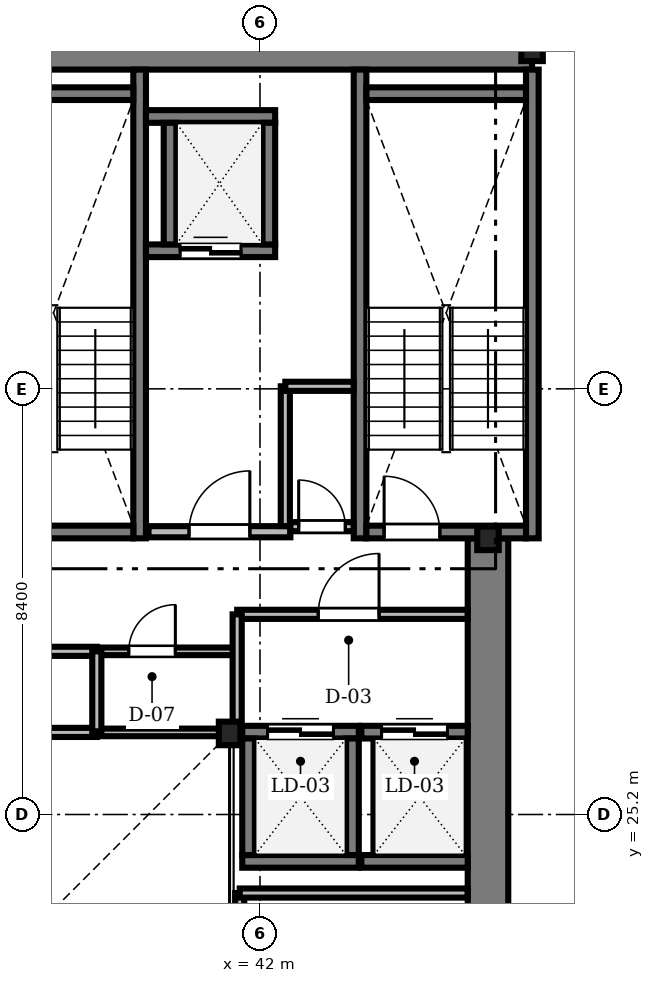
"""IFC4 building model, lengths in metres.
Left out: names, types, materials, properties, quantities, classifications, styles, units other than length and angle.
Written with IfcOpenShell. Run it as: python <this file> out.ifc"""

import sys

from ifc_helpers import new_model, si_unit, direction, frame, frame_2d, origin, origin_2d, place, context, subcontext, project, spatial, rectangle, i_section, extrude, source, transform, mapped, element, fill, save


model = new_model("IFC4")
c1 = context("Model", 3, precision=1e-05, world=origin(), true_north=direction((0.0, 1.0)))
c2 = subcontext(c1, "Body", "Model", "MODEL_VIEW")
j1 = project(units=[si_unit("LENGTHUNIT", "METRE"), si_unit("PLANEANGLEUNIT", "RADIAN")], contexts=[c1])
p1 = place(None, origin())
s1 = spatial("IfcSite", under=j1, at=p1, CompositionType="ELEMENT")
p2 = place(p1, origin())
s2 = spatial("IfcBuilding", under=s1, at=p2, CompositionType="ELEMENT")
p3 = place(p2, frame((0.0, 0.0, 129.8)))
s3 = spatial("IfcBuildingStorey", under=s2, at=p3, CompositionType="ELEMENT", Elevation=129.8)
m1 = source(origin(), c2, "Body", "SweptSolid", [
    extrude(rectangle(XDim=17.52, YDim=0.8, at=frame_2d((8.76, 0.0))), origin(), (0.0, 0.0, 1.0), 3.46),
])
p4 = place(p3, frame((29.85, 40.3, 0.0), z_axis=(0.0, 0.0, 1.0), x_axis=(1.0, 0.0, 0.0)))
e1 = element("IfcWall", 1, at=p4, inside=s3, PredefinedType="SHEAR", context=c2, shape_type="MappedRepresentation", body=[
    mapped(m1, transform((0.0, 0.0, 0.0), scale=1.0)),
])
m2 = source(origin(), c2, "Body", "SweptSolid", [
    extrude(rectangle(XDim=13.15, YDim=0.8, at=frame_2d((6.575, 0.0))), origin(), (0.0, 0.0, 1.0), 3.46),
])
p5 = place(p3, frame((46.5, 17.5, 0.0), z_axis=(0.0, 0.0, 1.0), x_axis=(0.0, 1.0, 0.0)))
e2 = element("IfcWall", 2, at=p5, inside=s3, PredefinedType="SHEAR", context=c2, shape_type="MappedRepresentation", body=[
    mapped(m2, transform((0.0, 0.0, 0.0), scale=1.0)),
])
m3 = source(origin(), c2, "Body", "SweptSolid", [
    extrude(i_section(OverallWidth=0.424, OverallDepth=0.465, WebThickness=0.035, FlangeThickness=0.056, FilletRadius=0.015, at=origin_2d()), origin(), (0.0, 0.0, 1.0), 3.46),
])
for number, where, z_axis, x_axis in (
    (3, (41.4, 26.8, 0.0), (0.0, 0.0, 1.0), (1.0, 0.0, 0.0)),
    (4, (46.5, 30.65, 0.0), (0.0, 0.0, 1.0), (1.0, 0.0, 0.0)),
    (5, (47.37, 40.3, 0.0), (0.0, 0.0, 1.0), (1.0, 0.0, 0.0)),
):
    element("IfcColumn", number, at=place(p3, frame(where, z_axis=z_axis, x_axis=x_axis)), inside=s3, PredefinedType="COLUMN", context=c2, shape_type="MappedRepresentation", body=[
        mapped(m3, transform((0.0, 0.0, 0.0), scale=1.0)),
    ])
m4 = source(origin(), c2, "Body", "SweptSolid", [
    extrude(rectangle(XDim=9.25, YDim=0.25, at=frame_2d((4.625, 0.0))), origin(), (0.0, 0.0, 1.0), 3.5),
])
p6 = place(p3, frame((39.625, 30.65, 0.0), z_axis=(0.0, 0.0, 1.0), x_axis=(0.0, 1.0, 0.0)))
e6 = element("IfcWall", 6, at=p6, inside=s3, PredefinedType="SOLIDWALL", context=c2, shape_type="MappedRepresentation", body=[
    mapped(m4, transform((0.0, 0.0, 0.0), scale=1.0)),
])
m5 = source(origin(), c2, "Body", "SweptSolid", [
    extrude(rectangle(XDim=3.15, YDim=0.25, at=frame_2d((1.575, 0.0))), origin(), (0.0, 0.0, 1.0), 3.5),
])
p7 = place(p3, frame((36.35, 39.425, 0.0), z_axis=(0.0, 0.0, 1.0), x_axis=(1.0, 0.0, 0.0)))
e7 = element("IfcWall", 7, at=p7, inside=s3, PredefinedType="SOLIDWALL", context=c2, shape_type="MappedRepresentation", body=[
    mapped(m5, transform((0.0, 0.0, 0.0), scale=1.0)),
])
p8 = place(p3, frame((36.35, 30.775, 0.0), z_axis=(0.0, 0.0, 1.0), x_axis=(1.0, 0.0, 0.0)))
e8 = element("IfcWall", 8, at=p8, inside=s3, PredefinedType="SOLIDWALL", context=c2, shape_type="MappedRepresentation", body=[
    mapped(m5, transform((0.0, 0.0, 0.0), scale=1.0)),
])
m6 = source(origin(), c2, "Body", "SweptSolid", [
    extrude(rectangle(XDim=1.1, YDim=2.2, at=frame_2d((0.55, 1.1))), frame((0.0, 0.135, 0.0), z_axis=(0.0, -1.0, 0.0), x_axis=(1.0, 0.0, 0.0)), (0.0, 0.0, 1.0), 0.27),
])
p9 = place(p8, frame((0.35, 0.0, 0.0)))
e9 = element("IfcOpeningElement", 9, at=p9, cuts=e8, PredefinedType="OPENING", context=c2, shape_type="MappedRepresentation", body=[
    mapped(m6, transform((0.0, 0.0, 0.0), scale=1.0)),
])
for number, where, z_axis, x_axis in (
    (10, (43.975, 30.65, 0.0), (0.0, 0.0, 1.0), (0.0, 1.0, 0.0)),
    (11, (47.375, 30.65, 0.0), (0.0, 0.0, 1.0), (0.0, 1.0, 0.0)),
):
    element("IfcWall", number, at=place(p3, frame(where, z_axis=z_axis, x_axis=x_axis)), inside=s3, PredefinedType="SOLIDWALL", context=c2, shape_type="MappedRepresentation", body=[
        mapped(m4, transform((0.0, 0.0, 0.0), scale=1.0)),
    ])
p10 = place(p3, frame((44.1, 39.425, 0.0), z_axis=(0.0, 0.0, 1.0), x_axis=(1.0, 0.0, 0.0)))
e12 = element("IfcWall", 12, at=p10, inside=s3, PredefinedType="SOLIDWALL", context=c2, shape_type="MappedRepresentation", body=[
    mapped(m5, transform((0.0, 0.0, 0.0), scale=1.0)),
])
p11 = place(p3, frame((44.1, 30.775, 0.0), z_axis=(0.0, 0.0, 1.0), x_axis=(1.0, 0.0, 0.0)))
e13 = element("IfcWall", 13, at=p11, inside=s3, PredefinedType="SOLIDWALL", context=c2, shape_type="MappedRepresentation", body=[
    mapped(m5, transform((0.0, 0.0, 0.0), scale=1.0)),
])
p12 = place(p11, frame((0.35, 0.0, 0.0)))
e14 = element("IfcOpeningElement", 14, at=p12, cuts=e13, PredefinedType="OPENING", context=c2, shape_type="MappedRepresentation", body=[
    mapped(m6, transform((0.0, 0.0, 0.0), scale=1.0)),
])
m7 = source(origin(), c2, "Body", "SweptSolid", [
    extrude(rectangle(XDim=2.8, YDim=0.22, at=frame_2d((1.4, 0.0))), origin(), (0.0, 0.0, 1.0), 3.46),
])
p13 = place(p3, frame((39.8, 30.78, 0.0), z_axis=(0.0, 0.0, 1.0), x_axis=(1.0, 0.0, 0.0)))
e15 = element("IfcWall", 15, at=p13, inside=s3, PredefinedType="SOLIDWALL", context=c2, shape_type="MappedRepresentation", body=[
    mapped(m7, transform((0.0, 0.0, 0.0), scale=1.0)),
])
m8 = source(origin(), c2, "Body", "SweptSolid", [
    extrude(rectangle(XDim=1.2, YDim=2.2, at=frame_2d((0.6, 1.1))), frame((0.0, 0.12, 0.0), z_axis=(0.0, -1.0, 0.0), x_axis=(1.0, 0.0, 0.0)), (0.0, 0.0, 1.0), 0.24),
])
p14 = place(p13, frame((0.8, 0.0, 0.0)))
e16 = element("IfcOpeningElement", 16, at=p14, cuts=e15, PredefinedType="OPENING", context=c2, shape_type="MappedRepresentation", body=[
    mapped(m8, transform((0.0, 0.0, 0.0), scale=1.0)),
])
m9 = source(origin(), c2, "Body", "SweptSolid", [
    extrude(rectangle(XDim=2.55, YDim=0.25, at=frame_2d((1.275, 0.0))), origin(), (0.0, 0.0, 1.0), 3.46),
])
p15 = place(p3, frame((39.75, 36.325, 0.0), z_axis=(0.0, 0.0, 1.0), x_axis=(1.0, 0.0, 0.0)))
e17 = element("IfcWall", 17, at=p15, inside=s3, PredefinedType="SOLIDWALL", context=c2, shape_type="MappedRepresentation", body=[
    mapped(m9, transform((0.0, 0.0, 0.0), scale=1.0)),
])
m10 = source(origin(), c2, "Body", "SweptSolid", [
    extrude(rectangle(XDim=1.2, YDim=2.25, at=frame_2d((0.6, 1.125))), frame((0.0, 0.135, 0.0), z_axis=(0.0, -1.0, 0.0), x_axis=(1.0, 0.0, 0.0)), (0.0, 0.0, 1.0), 0.27),
])
p16 = place(p15, frame((0.675, 0.0, 0.0)))
e18 = element("IfcOpeningElement", 18, at=p16, cuts=e17, PredefinedType="OPENING", context=c2, shape_type="MappedRepresentation", body=[
    mapped(m10, transform((0.0, 0.0, 0.0), scale=1.0)),
])
p17 = place(p3, frame((39.75, 38.975, 0.0), z_axis=(0.0, 0.0, 1.0), x_axis=(1.0, 0.0, 0.0)))
e19 = element("IfcWall", 19, at=p17, inside=s3, PredefinedType="SOLIDWALL", context=c2, shape_type="MappedRepresentation", body=[
    mapped(m9, transform((0.0, 0.0, 0.0), scale=1.0)),
])
m11 = source(origin(), c2, "Body", "SweptSolid", [
    extrude(rectangle(XDim=2.4, YDim=0.25, at=frame_2d((1.2, 0.0))), origin(), (0.0, 0.0, 1.0), 3.46),
])
for number, where, z_axis, x_axis in (
    (20, (40.225, 36.45, 0.0), (0.0, 0.0, 1.0), (0.0, 1.0, 0.0)),
    (21, (42.175, 36.45, 0.0), (0.0, 0.0, 1.0), (0.0, 1.0, 0.0)),
):
    element("IfcWall", number, at=place(p3, frame(where, z_axis=z_axis, x_axis=x_axis)), inside=s3, PredefinedType="SOLIDWALL", context=c2, shape_type="MappedRepresentation", body=[
        mapped(m11, transform((0.0, 0.0, 0.0), scale=1.0)),
    ])
m12 = source(origin(), c2, "Body", "SweptSolid", [
    extrude(rectangle(XDim=2.3, YDim=0.25, at=frame_2d((1.15, 0.0))), origin(), (0.0, 0.0, 1.0), 3.46),
])
p18 = place(p3, frame((41.65, 24.275, 0.0), z_axis=(0.0, 0.0, 1.0), x_axis=(1.0, 0.0, 0.0)))
e22 = element("IfcWall", 22, at=p18, inside=s3, PredefinedType="SOLIDWALL", context=c2, shape_type="MappedRepresentation", body=[
    mapped(m12, transform((0.0, 0.0, 0.0), scale=1.0)),
])
p19 = place(p3, frame((41.65, 26.825, 0.0), z_axis=(0.0, 0.0, 1.0), x_axis=(1.0, 0.0, 0.0)))
e23 = element("IfcWall", 23, at=p19, inside=s3, PredefinedType="SOLIDWALL", context=c2, shape_type="MappedRepresentation", body=[
    mapped(m12, transform((0.0, 0.0, 0.0), scale=1.0)),
])
m13 = source(origin(), c2, "Body", "SweptSolid", [
    extrude(rectangle(XDim=1.3, YDim=2.3, at=frame_2d((0.65, 1.15))), frame((0.0, 0.135, 0.0), z_axis=(0.0, -1.0, 0.0), x_axis=(1.0, 0.0, 0.0)), (0.0, 0.0, 1.0), 0.27),
])
p20 = place(p19, frame((0.5, 0.0, 0.0)))
e24 = element("IfcOpeningElement", 24, at=p20, cuts=e23, PredefinedType="OPENING", context=c2, shape_type="MappedRepresentation", body=[
    mapped(m13, transform((0.0, 0.0, 0.0), scale=1.0)),
])
for number, where, z_axis, x_axis in (
    (25, (41.775, 24.4, 0.0), (0.0, 0.0, 1.0), (0.0, 1.0, 0.0)),
    (26, (43.825, 24.4, 0.0), (0.0, 0.0, 1.0), (0.0, 1.0, 0.0)),
):
    element("IfcWall", number, at=place(p3, frame(where, z_axis=z_axis, x_axis=x_axis)), inside=s3, PredefinedType="SOLIDWALL", context=c2, shape_type="MappedRepresentation", body=[
        mapped(m12, transform((0.0, 0.0, 0.0), scale=1.0)),
    ])
m14 = source(origin(), c2, "Body", "SweptSolid", [
    extrude(rectangle(XDim=2.1, YDim=0.25, at=frame_2d((1.05, 0.0))), origin(), (0.0, 0.0, 1.0), 3.46),
])
p21 = place(p3, frame((44.0, 24.275, 0.0), z_axis=(0.0, 0.0, 1.0), x_axis=(1.0, 0.0, 0.0)))
e27 = element("IfcWall", 27, at=p21, inside=s3, PredefinedType="SOLIDWALL", context=c2, shape_type="MappedRepresentation", body=[
    mapped(m14, transform((0.0, 0.0, 0.0), scale=1.0)),
])
p22 = place(p3, frame((44.0, 26.825, 0.0), z_axis=(0.0, 0.0, 1.0), x_axis=(1.0, 0.0, 0.0)))
e28 = element("IfcWall", 28, at=p22, inside=s3, PredefinedType="SOLIDWALL", context=c2, shape_type="MappedRepresentation", body=[
    mapped(m14, transform((0.0, 0.0, 0.0), scale=1.0)),
])
p23 = place(p22, frame((0.4, 0.0, 0.0)))
e29 = element("IfcOpeningElement", 29, at=p23, cuts=e28, PredefinedType="OPENING", context=c2, shape_type="MappedRepresentation", body=[
    mapped(m13, transform((0.0, 0.0, 0.0), scale=1.0)),
])
m15 = source(origin(), c2, "Body", "SweptSolid", [
    extrude(rectangle(XDim=7.33, YDim=0.18, at=frame_2d((3.665, 0.0))), origin(), (0.0, 0.0, 1.0), 3.092),
])
p24 = place(p3, frame((31.45, 28.42, 0.0), z_axis=(0.0, 0.0, 1.0), x_axis=(1.0, 0.0, 0.0)))
e30 = element("IfcWall", 30, at=p24, inside=s3, PredefinedType="PARTITIONING", context=c2, shape_type="MappedRepresentation", body=[
    mapped(m15, transform((0.0, 0.0, 0.0), scale=1.0)),
])
m16 = source(origin(), c2, "Body", "SweptSolid", [
    extrude(rectangle(XDim=0.95, YDim=2.15, at=frame_2d((0.475, 1.075))), frame((0.0, 0.1, 0.0), z_axis=(0.0, -1.0, 0.0), x_axis=(1.0, 0.0, 0.0)), (0.0, 0.0, 1.0), 0.2),
])
p25 = place(p24, frame((0.65, 0.0, 0.0)))
e31 = element("IfcOpeningElement", 31, at=p25, cuts=e30, PredefinedType="OPENING", context=c2, shape_type="MappedRepresentation", body=[
    mapped(m16, transform((0.0, 0.0, 0.0), scale=1.0)),
])
m17 = source(origin(), c2, "Body", "SweptSolid", [
    extrude(rectangle(XDim=4.548, YDim=0.18, at=frame_2d((2.274, 0.0))), origin(), (0.0, 0.0, 1.0), 3.092),
])
p26 = place(p3, frame((41.55, 29.15, 0.0), z_axis=(0.0, 0.0, 1.0), x_axis=(1.0, 0.0, 0.0)))
e32 = element("IfcWall", 32, at=p26, inside=s3, PredefinedType="PARTITIONING", context=c2, shape_type="MappedRepresentation", body=[
    mapped(m17, transform((0.0, 0.0, 0.0), scale=1.0)),
])
m18 = source(origin(), c2, "Body", "SweptSolid", [
    extrude(rectangle(XDim=1.2, YDim=2.2, at=frame_2d((0.6, 1.1))), frame((0.0, 0.1, 0.0), z_axis=(0.0, -1.0, 0.0), x_axis=(1.0, 0.0, 0.0)), (0.0, 0.0, 1.0), 0.2),
])
p27 = place(p26, frame((1.6, 0.0, 0.0)))
e33 = element("IfcOpeningElement", 33, at=p27, cuts=e32, PredefinedType="OPENING", context=c2, shape_type="MappedRepresentation", body=[
    mapped(m18, transform((0.0, 0.0, 0.0), scale=1.0)),
])
m19 = source(origin(), c2, "Body", "SweptSolid", [
    extrude(rectangle(XDim=2.74, YDim=0.15, at=frame_2d((1.37, 0.0))), origin(), (0.0, 0.0, 1.0), 3.46),
])
p28 = place(p3, frame((38.78, 28.42, 0.0), z_axis=(0.0, 0.0, 1.0), x_axis=(1.0, 0.0, 0.0)))
e34 = element("IfcWall", 34, at=p28, inside=s3, PredefinedType="PARTITIONING", context=c2, shape_type="MappedRepresentation", body=[
    mapped(m19, transform((0.0, 0.0, 0.0), scale=1.0)),
])
m20 = source(origin(), c2, "Body", "SweptSolid", [
    extrude(rectangle(XDim=0.92, YDim=2.1, at=frame_2d((0.46, 1.05))), frame((0.0, 0.085, 0.0), z_axis=(0.0, -1.0, 0.0), x_axis=(1.0, 0.0, 0.0)), (0.0, 0.0, 1.0), 0.17),
])
p29 = place(p28, frame((0.63, 0.0, 0.0)))
e35 = element("IfcOpeningElement", 35, at=p29, cuts=e34, PredefinedType="OPENING", context=c2, shape_type="MappedRepresentation", body=[
    mapped(m20, transform((0.0, 0.0, 0.0), scale=1.0)),
])
m21 = source(origin(), c2, "Body", "SweptSolid", [
    extrude(rectangle(XDim=1.248, YDim=0.18, at=frame_2d((0.624, 0.0))), origin(), (0.0, 0.0, 1.0), 3.46),
])
p30 = place(p3, frame((42.6, 30.88, 0.0), z_axis=(0.0, 0.0, 1.0), x_axis=(1.0, 0.0, 0.0)))
e36 = element("IfcWall", 36, at=p30, inside=s3, PredefinedType="PARTITIONING", context=c2, shape_type="MappedRepresentation", body=[
    mapped(m21, transform((0.0, 0.0, 0.0), scale=1.0)),
])
m22 = source(origin(), c2, "Body", "SweptSolid", [
    extrude(rectangle(XDim=0.92, YDim=2.1, at=frame_2d((0.46, 1.05))), frame((0.0, 0.1, 0.0), z_axis=(0.0, -1.0, 0.0), x_axis=(1.0, 0.0, 0.0)), (0.0, 0.0, 1.0), 0.2),
])
p31 = place(p30, frame((0.164, 0.0, 0.0)))
e37 = element("IfcOpeningElement", 37, at=p31, cuts=e36, PredefinedType="OPENING", context=c2, shape_type="MappedRepresentation", body=[
    mapped(m22, transform((0.0, 0.0, 0.0), scale=1.0)),
])
m23 = source(origin(), c2, "Body", "SweptSolid", [
    extrude(rectangle(XDim=7.33, YDim=0.18, at=frame_2d((3.665, 0.0))), origin(), (0.0, 0.0, 1.0), 3.002),
])
p32 = place(p3, frame((31.45, 26.82, 0.0), z_axis=(0.0, 0.0, 1.0), x_axis=(1.0, 0.0, 0.0)))
e38 = element("IfcWall", 38, at=p32, inside=s3, PredefinedType="PARTITIONING", context=c2, shape_type="MappedRepresentation", body=[
    mapped(m23, transform((0.0, 0.0, 0.0), scale=1.0)),
])
m24 = source(origin(), c2, "Body", "SweptSolid", [
    extrude(rectangle(XDim=7.15, YDim=0.18, at=frame_2d((3.575, 0.0))), origin(), (0.0, 0.0, 1.0), 2.852),
])
p33 = place(p3, frame((41.6, 16.5, 0.0), z_axis=(0.0, 0.0, 1.0), x_axis=(0.0, 1.0, 0.0)))
e39 = element("IfcWall", 39, at=p33, inside=s3, PredefinedType="PARTITIONING", context=c2, shape_type="MappedRepresentation", body=[
    mapped(m24, transform((0.0, 0.0, 0.0), scale=1.0)),
])
m25 = source(origin(), c2, "Body", "SweptSolid", [
    extrude(rectangle(XDim=4.498, YDim=0.18, at=frame_2d((2.249, 0.0))), origin(), (0.0, 0.0, 1.0), 3.46),
])
p34 = place(p3, frame((41.6, 23.65, 0.0), z_axis=(0.0, 0.0, 1.0), x_axis=(1.0, 0.0, 0.0)))
e40 = element("IfcWall", 40, at=p34, inside=s3, PredefinedType="PARTITIONING", context=c2, shape_type="MappedRepresentation", body=[
    mapped(m25, transform((0.0, 0.0, 0.0), scale=1.0)),
])
m26 = source(origin(), c2, "Body", "SweptSolid", [
    extrude(rectangle(XDim=2.758, YDim=0.18, at=frame_2d((1.379, 0.0))), origin(), (0.0, 0.0, 1.0), 3.46),
])
p35 = place(p3, frame((42.5, 30.892, 0.0), z_axis=(0.0, 0.0, 1.0), x_axis=(0.0, 1.0, 0.0)))
e41 = element("IfcWall", 41, at=p35, inside=s3, PredefinedType="PARTITIONING", context=c2, shape_type="MappedRepresentation", body=[
    mapped(m26, transform((0.0, 0.0, 0.0), scale=1.0)),
])
m27 = source(origin(), c2, "Body", "SweptSolid", [
    extrude(rectangle(XDim=2.74, YDim=0.15, at=frame_2d((1.37, 0.0))), origin(), (0.0, 0.0, 1.0), 2.852),
])
p36 = place(p3, frame((38.78, 26.82, 0.0), z_axis=(0.0, 0.0, 1.0), x_axis=(1.0, 0.0, 0.0)))
e42 = element("IfcWall", 42, at=p36, inside=s3, PredefinedType="PARTITIONING", context=c2, shape_type="MappedRepresentation", body=[
    mapped(m27, transform((0.0, 0.0, 0.0), scale=1.0)),
])
m28 = source(origin(), c2, "Body", "SweptSolid", [
    extrude(rectangle(XDim=2.35, YDim=0.18, at=frame_2d((1.175, 0.0))), origin(), (0.0, 0.0, 1.0), 2.852),
])
p37 = place(p3, frame((41.55, 26.8, 0.0), z_axis=(0.0, 0.0, 1.0), x_axis=(0.0, 1.0, 0.0)))
e43 = element("IfcWall", 43, at=p37, inside=s3, PredefinedType="PARTITIONING", context=c2, shape_type="MappedRepresentation", body=[
    mapped(m28, transform((0.0, 0.0, 0.0), scale=1.0)),
])
m29 = source(origin(), c2, "Body", "SweptSolid", [
    extrude(rectangle(XDim=1.6, YDim=0.18, at=frame_2d((0.8, 0.0))), origin(), (0.0, 0.0, 1.0), 3.002),
])
p38 = place(p3, frame((38.78, 26.82, 0.0), z_axis=(0.0, 0.0, 1.0), x_axis=(0.0, 1.0, 0.0)))
e44 = element("IfcWall", 44, at=p38, inside=s3, PredefinedType="PARTITIONING", context=c2, shape_type="MappedRepresentation", body=[
    mapped(m29, transform((0.0, 0.0, 0.0), scale=1.0)),
])
m30 = source(origin(), c2, "Body", "SweptSolid", [
    extrude(rectangle(XDim=1.348, YDim=0.18, at=frame_2d((0.674, 0.0))), origin(), (0.0, 0.0, 1.0), 3.46),
])
p39 = place(p3, frame((42.5, 33.65, 0.0), z_axis=(0.0, 0.0, 1.0), x_axis=(1.0, 0.0, 0.0)))
e45 = element("IfcWall", 45, at=p39, inside=s3, PredefinedType="PARTITIONING", context=c2, shape_type="MappedRepresentation", body=[
    mapped(m30, transform((0.0, 0.0, 0.0), scale=1.0)),
])
m31 = source(origin(), c2, "Body", "SweptSolid", [
    extrude(rectangle(XDim=1.1, YDim=2.2, at=frame_2d((0.55, 1.1))), frame((0.0, 0.025, 0.0), z_axis=(0.0, -1.0, 0.0), x_axis=(1.0, 0.0, 0.0)), (0.0, 0.0, 1.0), 0.05),
])
p40 = place(p12, origin())
e46 = element("IfcDoor", 46, at=p40, inside=s3, OperationType="SINGLE_SWING_LEFT", PredefinedType="DOOR", context=c2, shape_type="MappedRepresentation", body=[
    mapped(m31, transform((0.0, 0.0, 0.0), scale=1.0)),
])
fill(e14, e46)
m32 = source(origin(), c2, "Body", "SweptSolid", [
    extrude(rectangle(XDim=1.2, YDim=2.2, at=frame_2d((0.6, 1.1))), frame((0.0, 0.025, 0.0), z_axis=(0.0, -1.0, 0.0), x_axis=(1.0, 0.0, 0.0)), (0.0, 0.0, 1.0), 0.05),
])
p41 = place(p14, origin())
e47 = element("IfcDoor", 47, at=p41, inside=s3, OperationType="SINGLE_SWING_RIGHT", PredefinedType="DOOR", context=c2, shape_type="MappedRepresentation", body=[
    mapped(m32, transform((0.0, 0.0, 0.0), scale=1.0)),
])
fill(e16, e47)
m33 = source(origin(), c2, "Body", "SweptSolid", [
    extrude(rectangle(XDim=1.2, YDim=2.25, at=frame_2d((0.6, 1.125))), frame((0.0, 0.025, 0.0), z_axis=(0.0, -1.0, 0.0), x_axis=(1.0, 0.0, 0.0)), (0.0, 0.0, 1.0), 0.05),
])
p42 = place(p16, origin())
e48 = element("IfcDoor", 48, at=p42, inside=s3, OperationType="DOUBLE_DOOR_SLIDING", PredefinedType="DOOR", context=c2, shape_type="MappedRepresentation", body=[
    mapped(m33, transform((0.0, 0.0, 0.0), scale=1.0)),
])
fill(e18, e48)
m34 = source(origin(), c2, "Body", "SweptSolid", [
    extrude(rectangle(XDim=1.3, YDim=2.3, at=frame_2d((0.65, 1.15))), frame((0.0, 0.025, 0.0), z_axis=(0.0, -1.0, 0.0), x_axis=(1.0, 0.0, 0.0)), (0.0, 0.0, 1.0), 0.05),
])
p43 = place(p20, origin())
e49 = element("IfcDoor", 49, at=p43, inside=s3, OperationType="DOUBLE_DOOR_SLIDING", PredefinedType="DOOR", context=c2, shape_type="MappedRepresentation", body=[
    mapped(m34, transform((0.0, 0.0, 0.0), scale=1.0)),
])
fill(e24, e49)
p44 = place(p23, origin())
e50 = element("IfcDoor", 50, at=p44, inside=s3, OperationType="DOUBLE_DOOR_SLIDING", PredefinedType="DOOR", context=c2, shape_type="MappedRepresentation", body=[
    mapped(m34, transform((0.0, 0.0, 0.0), scale=1.0)),
])
fill(e29, e50)
p45 = place(p27, origin())
e51 = element("IfcDoor", 51, at=p45, inside=s3, OperationType="SINGLE_SWING_RIGHT", PredefinedType="DOOR", context=c2, shape_type="MappedRepresentation", body=[
    mapped(m32, transform((0.0, 0.0, 0.0), scale=1.0)),
])
fill(e33, e51)
m35 = source(origin(), c2, "Body", "SweptSolid", [
    extrude(rectangle(XDim=0.92, YDim=2.1, at=frame_2d((0.46, 1.05))), frame((0.0, 0.025, 0.0), z_axis=(0.0, -1.0, 0.0), x_axis=(1.0, 0.0, 0.0)), (0.0, 0.0, 1.0), 0.05),
])
p46 = place(p29, origin())
e52 = element("IfcDoor", 52, at=p46, inside=s3, OperationType="SINGLE_SWING_RIGHT", PredefinedType="DOOR", context=c2, shape_type="MappedRepresentation", body=[
    mapped(m35, transform((0.0, 0.0, 0.0), scale=1.0)),
])
fill(e35, e52)
p47 = place(p31, origin())
e53 = element("IfcDoor", 53, at=p47, inside=s3, OperationType="SINGLE_SWING_LEFT", PredefinedType="DOOR", context=c2, shape_type="MappedRepresentation", body=[
    mapped(m35, transform((0.0, 0.0, 0.0), scale=1.0)),
])
fill(e37, e53)
save(model, sys.argv[1])
